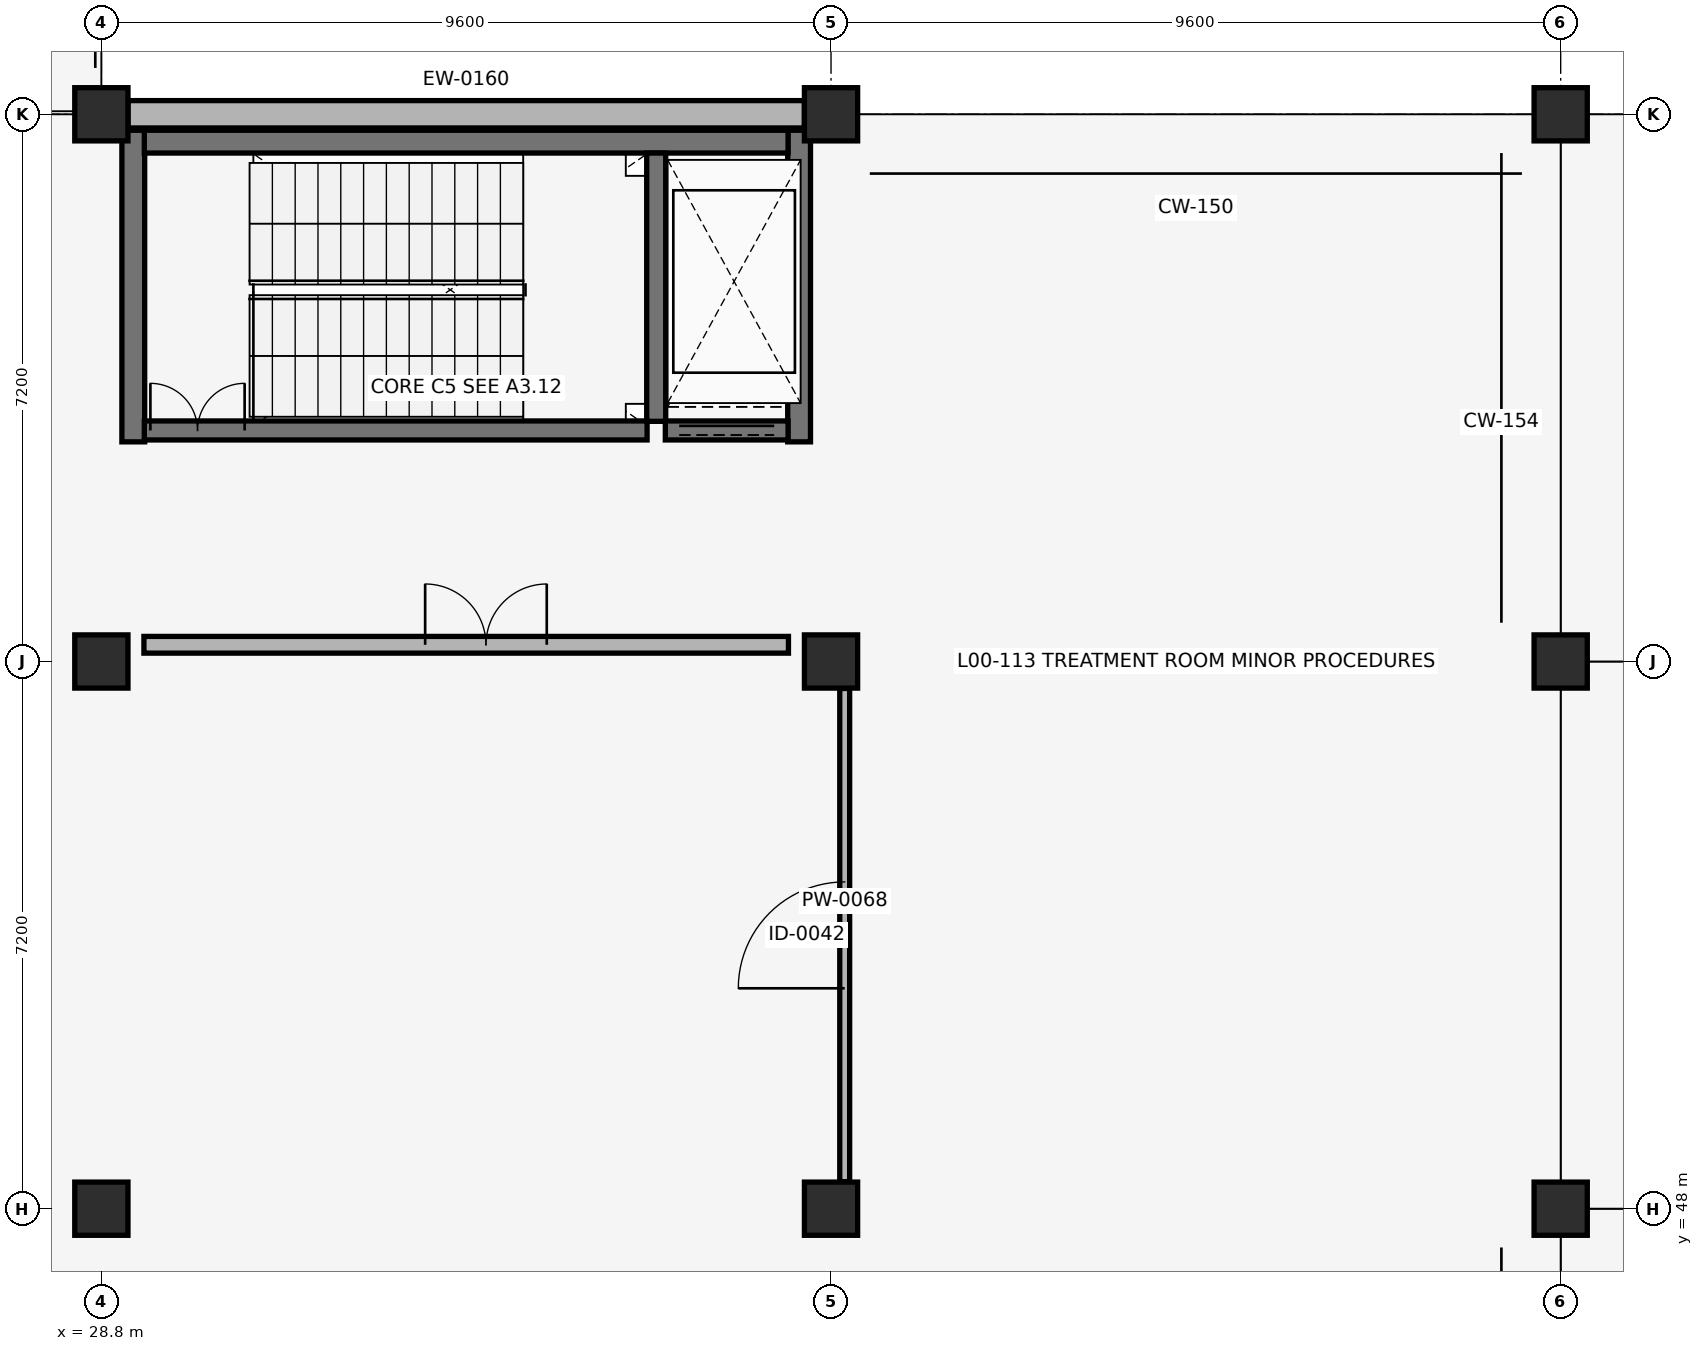
"""IFC4 building model, lengths in metres.
Left out: names, types, materials, properties, quantities, classifications, styles, units other than length and angle.
Written with IfcOpenShell. Run it as: python <this file> out.ifc"""

import sys

from ifc_helpers import new_model, si_unit, direction, frame, frame_2d, origin, origin_2d, place, context, subcontext, project, spatial, rectangle, circle, extrude, element, fill, save


model = new_model("IFC4")
c1 = context("Model", 3, precision=1e-05, world=origin(), true_north=direction((0.0, 1.0)))
c2 = subcontext(c1, "Body", "Model", "MODEL_VIEW")
j1 = project(units=[si_unit("LENGTHUNIT", "METRE"), si_unit("PLANEANGLEUNIT", "RADIAN")], contexts=[c1])
p1 = place(None, origin())
s1 = spatial("IfcSite", under=j1, at=p1, CompositionType="ELEMENT")
p2 = place(p1, origin())
s2 = spatial("IfcBuilding", under=s1, at=p2, CompositionType="ELEMENT")
p3 = place(p2, origin())
s3 = spatial("IfcBuildingStorey", under=s2, at=p3, CompositionType="ELEMENT", Elevation=0.0)
for number, where, z_axis, x_axis in (
    (1, (28.8, 48.0, 0.0), (0.0, 0.0, 1.0), (1.0, 0.0, 0.0)),
    (2, (28.8, 55.2, 0.0), (0.0, 0.0, 1.0), (1.0, 0.0, 0.0)),
    (3, (28.8, 62.4, 0.0), (0.0, 0.0, 1.0), (1.0, 0.0, 0.0)),
    (4, (38.4, 48.0, 0.0), (0.0, 0.0, 1.0), (1.0, 0.0, 0.0)),
    (5, (38.4, 55.2, 0.0), (0.0, 0.0, 1.0), (1.0, 0.0, 0.0)),
    (6, (38.4, 62.4, 0.0), (0.0, 0.0, 1.0), (1.0, 0.0, 0.0)),
    (7, (48.0, 48.0, 0.0), (0.0, 0.0, 1.0), (1.0, 0.0, 0.0)),
    (8, (48.0, 55.2, 0.0), (0.0, 0.0, 1.0), (1.0, 0.0, 0.0)),
    (9, (48.0, 62.4, 0.0), (0.0, 0.0, 1.0), (1.0, 0.0, 0.0)),
):
    element("IfcColumn", number, at=place(p3, frame(where, z_axis=z_axis, x_axis=x_axis)), inside=s3, PredefinedType="COLUMN", context=c2, shape_type="SweptSolid", body=[
        extrude(circle(Radius=0.35, at=origin_2d()), origin(), (0.0, 0.0, 1.0), 4.42),
    ])
p4 = place(p3, frame((38.05, 62.4, 0.0), z_axis=(0.0, 0.0, 1.0), x_axis=(-1.0, 0.0, 0.0)))
e10 = element("IfcWall", 10, at=p4, inside=s3, PredefinedType="SOLIDWALL", context=c2, shape_type="SweptSolid", body=[
    extrude(rectangle(XDim=8.9, YDim=0.36, at=frame_2d((4.45, 0.0))), origin(), (0.0, 0.0, 1.0), 3.4),
])
for number, where, z_axis, x_axis in (
    (11, (29.22, 58.09, 0.0), (0.0, 0.0, 1.0), (0.0, 1.0, 0.0)),
    (12, (37.98, 58.09, 0.0), (0.0, 0.0, 1.0), (0.0, 1.0, 0.0)),
):
    element("IfcWall", number, at=place(p3, frame(where, z_axis=z_axis, x_axis=x_axis)), inside=s3, PredefinedType="SHEAR", context=c2, shape_type="SweptSolid", body=[
        extrude(rectangle(XDim=4.1, YDim=0.3, at=frame_2d((2.05, 0.0))), origin(), (0.0, 0.0, 1.0), 4.12),
    ])
p5 = place(p3, frame((29.365, 62.04, 0.0), z_axis=(0.0, 0.0, 1.0), x_axis=(1.0, 0.0, 0.0)))
e13 = element("IfcWall", 13, at=p5, inside=s3, PredefinedType="SHEAR", context=c2, shape_type="SweptSolid", body=[
    extrude(rectangle(XDim=8.47, YDim=0.3, at=frame_2d((4.235, 0.0))), origin(), (0.0, 0.0, 1.0), 4.12),
])
p6 = place(p3, frame((36.1, 58.36, 0.0), z_axis=(0.0, 0.0, 1.0), x_axis=(0.0, 1.0, 0.0)))
e14 = element("IfcWall", 14, at=p6, inside=s3, PredefinedType="SHEAR", context=c2, shape_type="SweptSolid", body=[
    extrude(rectangle(XDim=3.53, YDim=0.25, at=frame_2d((1.765, 0.0))), origin(), (0.0, 0.0, 1.0), 4.12),
])
p7 = place(p3, frame((29.365, 58.24, 0.0), z_axis=(0.0, 0.0, 1.0), x_axis=(1.0, 0.0, 0.0)))
e15 = element("IfcWall", 15, at=p7, inside=s3, PredefinedType="SHEAR", context=c2, shape_type="SweptSolid", body=[
    extrude(rectangle(XDim=6.615, YDim=0.25, at=frame_2d((3.308, 0.0))), origin(), (0.0, 0.0, 1.0), 4.12),
])
p8 = place(p7, frame((0.08, 0.0, 0.0)))
e16 = element("IfcOpeningElement", 16, at=p8, cuts=e15, PredefinedType="OPENING", context=c2, shape_type="SweptSolid", body=[
    extrude(rectangle(XDim=1.24, YDim=2.15, at=frame_2d((0.62, 1.075))), frame((0.0, 0.135, 0.0), z_axis=(0.0, -1.0, 0.0), x_axis=(1.0, 0.0, 0.0)), (0.0, 0.0, 1.0), 0.27),
])
p9 = place(p3, frame((29.36, 55.42, 0.0), z_axis=(0.0, 0.0, 1.0), x_axis=(1.0, 0.0, 0.0)))
e17 = element("IfcWall", 17, at=p9, inside=s3, PredefinedType="PARTITIONING", context=c2, shape_type="SweptSolid", body=[
    extrude(rectangle(XDim=8.48, YDim=0.22, at=frame_2d((4.24, 0.0))), origin(), (0.0, 0.0, 1.0), 3.45),
])
p10 = place(p9, frame((3.7, 0.0, 0.0)))
e18 = element("IfcOpeningElement", 18, at=p10, cuts=e17, PredefinedType="OPENING", context=c2, shape_type="SweptSolid", body=[
    extrude(rectangle(XDim=1.6, YDim=2.2, at=frame_2d((0.8, 1.1))), frame((0.0, 0.12, 0.0), z_axis=(0.0, -1.0, 0.0), x_axis=(1.0, 0.0, 0.0)), (0.0, 0.0, 1.0), 0.24),
])
p11 = place(p3, frame((36.22, 58.24, 0.0), z_axis=(0.0, 0.0, 1.0), x_axis=(1.0, 0.0, 0.0)))
e19 = element("IfcWall", 19, at=p11, inside=s3, PredefinedType="SHEAR", context=c2, shape_type="SweptSolid", body=[
    extrude(rectangle(XDim=1.615, YDim=0.25, at=frame_2d((0.808, 0.0))), origin(), (0.0, 0.0, 1.0), 4.12),
])
p12 = place(p11, frame((0.183, 0.0, 0.0)))
e20 = element("IfcOpeningElement", 20, at=p12, cuts=e19, PredefinedType="OPENING", context=c2, shape_type="SweptSolid", body=[
    extrude(rectangle(XDim=1.25, YDim=2.15, at=frame_2d((0.625, 1.075))), frame((0.0, 0.135, 0.0), z_axis=(0.0, -1.0, 0.0), x_axis=(1.0, 0.0, 0.0)), (0.0, 0.0, 1.0), 0.27),
])
p13 = place(p3, frame((38.58, 48.355, 0.0), z_axis=(0.0, 0.0, 1.0), x_axis=(0.0, 1.0, 0.0)))
e21 = element("IfcWall", 21, at=p13, inside=s3, PredefinedType="PARTITIONING", context=c2, shape_type="SweptSolid", body=[
    extrude(rectangle(XDim=6.49, YDim=0.13, at=frame_2d((3.245, 0.0))), origin(), (0.0, 0.0, 1.0), 3.46),
])
p14 = place(p13, frame((2.545, 0.0, 0.0)))
e22 = element("IfcOpeningElement", 22, at=p14, cuts=e21, PredefinedType="OPENING", context=c2, shape_type="SweptSolid", body=[
    extrude(rectangle(XDim=1.4, YDim=2.12, at=frame_2d((0.7, 1.06))), frame((0.0, 0.075, 0.0), z_axis=(0.0, -1.0, 0.0), x_axis=(1.0, 0.0, 0.0)), (0.0, 0.0, 1.0), 0.15),
])
p15 = place(p8, origin())
e23 = element("IfcDoor", 23, at=p15, inside=s3, OperationType="DOUBLE_DOOR_SINGLE_SWING", PredefinedType="DOOR", context=c2, shape_type="SweptSolid", body=[
    extrude(rectangle(XDim=1.24, YDim=2.15, at=frame_2d((0.62, 1.075))), frame((0.0, 0.025, 0.0), z_axis=(0.0, -1.0, 0.0), x_axis=(1.0, 0.0, 0.0)), (0.0, 0.0, 1.0), 0.05),
])
fill(e16, e23)
p16 = place(p10, origin())
e24 = element("IfcDoor", 24, at=p16, inside=s3, OperationType="DOUBLE_DOOR_SINGLE_SWING", PredefinedType="DOOR", context=c2, shape_type="SweptSolid", body=[
    extrude(rectangle(XDim=1.6, YDim=2.2, at=frame_2d((0.8, 1.1))), frame((0.0, 0.025, 0.0), z_axis=(0.0, -1.0, 0.0), x_axis=(1.0, 0.0, 0.0)), (0.0, 0.0, 1.0), 0.05),
])
fill(e18, e24)
p17 = place(p12, origin())
e25 = element("IfcDoor", 25, at=p17, inside=s3, OperationType="DOUBLE_DOOR_SLIDING", PredefinedType="DOOR", context=c2, shape_type="SweptSolid", body=[
    extrude(rectangle(XDim=1.25, YDim=2.15, at=frame_2d((0.625, 1.075))), frame((0.0, 0.025, 0.0), z_axis=(0.0, -1.0, 0.0), x_axis=(1.0, 0.0, 0.0)), (0.0, 0.0, 1.0), 0.05),
])
fill(e20, e25)
p18 = place(p14, origin())
e26 = element("IfcDoor", 26, at=p18, inside=s3, OperationType="SINGLE_SWING_LEFT", PredefinedType="DOOR", context=c2, shape_type="SweptSolid", body=[
    extrude(rectangle(XDim=1.4, YDim=2.12, at=frame_2d((0.7, 1.06))), frame((0.0, 0.025, 0.0), z_axis=(0.0, -1.0, 0.0), x_axis=(1.0, 0.0, 0.0)), (0.0, 0.0, 1.0), 0.05),
])
fill(e22, e26)
save(model, sys.argv[1])
